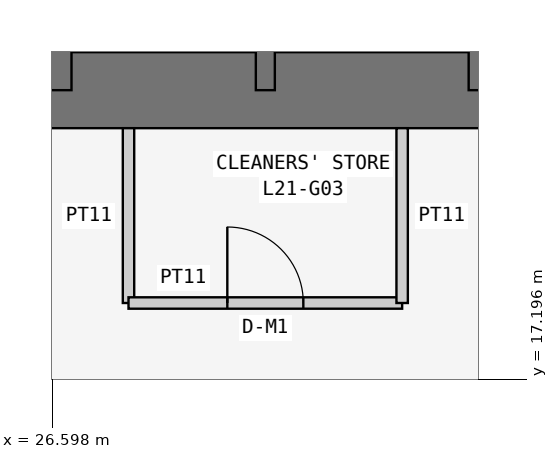
"""IFC4 building model, lengths in metres.
Left out: names, types, materials, properties, quantities, classifications, styles, units other than length and angle.
Written with IfcOpenShell. Run it as: python <this file> out.ifc"""

import sys

from ifc_helpers import new_model, si_unit, direction, frame, frame_2d, origin, place, context, subcontext, project, spatial, rectangle, extrude, element, fill, save


model = new_model("IFC4")
c1 = context("Model", 3, precision=1e-05, world=origin(), true_north=direction((0.0, 1.0)))
c2 = subcontext(c1, "Body", "Model", "MODEL_VIEW")
j1 = project(units=[si_unit("LENGTHUNIT", "METRE"), si_unit("PLANEANGLEUNIT", "RADIAN")], contexts=[c1])
p1 = place(None, origin())
s1 = spatial("IfcSite", under=j1, at=p1, CompositionType="ELEMENT")
p2 = place(p1, origin())
s2 = spatial("IfcBuilding", under=s1, at=p2, CompositionType="ELEMENT")
p3 = place(p2, frame((0.0, 0.0, 84.9)))
s3 = spatial("IfcBuildingStorey", under=s2, at=p3, CompositionType="ELEMENT", Elevation=84.9)
p4 = place(p3, frame((21.0, 21.0, 0.0), z_axis=(0.0, 0.0, 1.0), x_axis=(1.0, 0.0, 0.0)))
e1 = element("IfcWall", 1, at=p4, inside=s3, PredefinedType="SHEAR", context=c2, shape_type="SweptSolid", body=[
    extrude(rectangle(XDim=17.3, YDim=1.0, at=frame_2d((8.65, 0.0))), origin(), (0.0, 0.0, 1.0), 3.6),
])
p5 = place(p3, frame((26.6, 21.0, 0.0), z_axis=(0.0, 0.0, 1.0), x_axis=(0.0, 1.0, 0.0)))
e2 = element("IfcWall", 2, at=p5, inside=s3, PredefinedType="SHEAR", context=c2, shape_type="SweptSolid", body=[
    extrude(rectangle(XDim=16.8, YDim=0.5, at=frame_2d((8.4, 0.0))), origin(), (0.0, 0.0, 1.0), 3.6),
])
p6 = place(p5, frame((10.4, 0.0, 0.0)))
e3 = element("IfcOpeningElement", 3, at=p6, cuts=e2, PredefinedType="OPENING", context=c2, shape_type="SweptSolid", body=[
    extrude(rectangle(XDim=1.2, YDim=2.1, at=frame_2d((0.6, 1.05))), frame((0.0, 0.26, 0.0), z_axis=(0.0, -1.0, 0.0), x_axis=(1.0, 0.0, 0.0)), (0.0, 0.0, 1.0), 0.52),
])
for number, where, z_axis, x_axis in (
    (4, (29.4, 21.0, 0.0), (0.0, 0.0, 1.0), (0.0, 1.0, 0.0)),
    (5, (32.2, 21.0, 0.0), (0.0, 0.0, 1.0), (0.0, 1.0, 0.0)),
):
    element("IfcWall", number, at=place(p3, frame(where, z_axis=z_axis, x_axis=x_axis)), inside=s3, PredefinedType="SHEAR", context=c2, shape_type="SweptSolid", body=[
        extrude(rectangle(XDim=3.2, YDim=0.25, at=frame_2d((1.6, 0.0))), origin(), (0.0, 0.0, 1.0), 3.6),
    ])
p7 = place(p3, frame((27.6, 20.5, 0.0), z_axis=(0.0, 0.0, 1.0), x_axis=(0.0, -1.0, 0.0)))
e6 = element("IfcWall", 6, at=p7, inside=s3, PredefinedType="PARTITIONING", context=c2, shape_type="SweptSolid", body=[
    extrude(rectangle(XDim=2.3, YDim=0.15, at=frame_2d((1.15, 0.0))), origin(), (0.0, 0.0, 1.0), 3.45),
])
p8 = place(p3, frame((27.6, 18.2, 0.0), z_axis=(0.0, 0.0, 1.0), x_axis=(1.0, 0.0, 0.0)))
e7 = element("IfcWall", 7, at=p8, inside=s3, PredefinedType="PARTITIONING", context=c2, shape_type="SweptSolid", body=[
    extrude(rectangle(XDim=3.6, YDim=0.15, at=frame_2d((1.8, 0.0))), origin(), (0.0, 0.0, 1.0), 3.45),
])
p9 = place(p8, frame((1.3, 0.0, 0.0)))
e8 = element("IfcOpeningElement", 8, at=p9, cuts=e7, PredefinedType="OPENING", context=c2, shape_type="SweptSolid", body=[
    extrude(rectangle(XDim=1.0, YDim=2.1, at=frame_2d((0.5, 1.05))), frame((0.0, 0.085, 0.0), z_axis=(0.0, -1.0, 0.0), x_axis=(1.0, 0.0, 0.0)), (0.0, 0.0, 1.0), 0.17),
])
p10 = place(p3, frame((31.2, 18.2, 0.0), z_axis=(0.0, 0.0, 1.0), x_axis=(0.0, 1.0, 0.0)))
e9 = element("IfcWall", 9, at=p10, inside=s3, PredefinedType="PARTITIONING", context=c2, shape_type="SweptSolid", body=[
    extrude(rectangle(XDim=2.3, YDim=0.15, at=frame_2d((1.15, 0.0))), origin(), (0.0, 0.0, 1.0), 3.45),
])
p11 = place(p9, origin())
e10 = element("IfcDoor", 10, at=p11, inside=s3, OperationType="SINGLE_SWING_LEFT", PredefinedType="DOOR", context=c2, shape_type="SweptSolid", body=[
    extrude(rectangle(XDim=1.0, YDim=2.1, at=frame_2d((0.5, 1.05))), frame((0.0, 0.025, 0.0), z_axis=(0.0, -1.0, 0.0), x_axis=(1.0, 0.0, 0.0)), (0.0, 0.0, 1.0), 0.05),
])
fill(e8, e10)
save(model, sys.argv[1])
